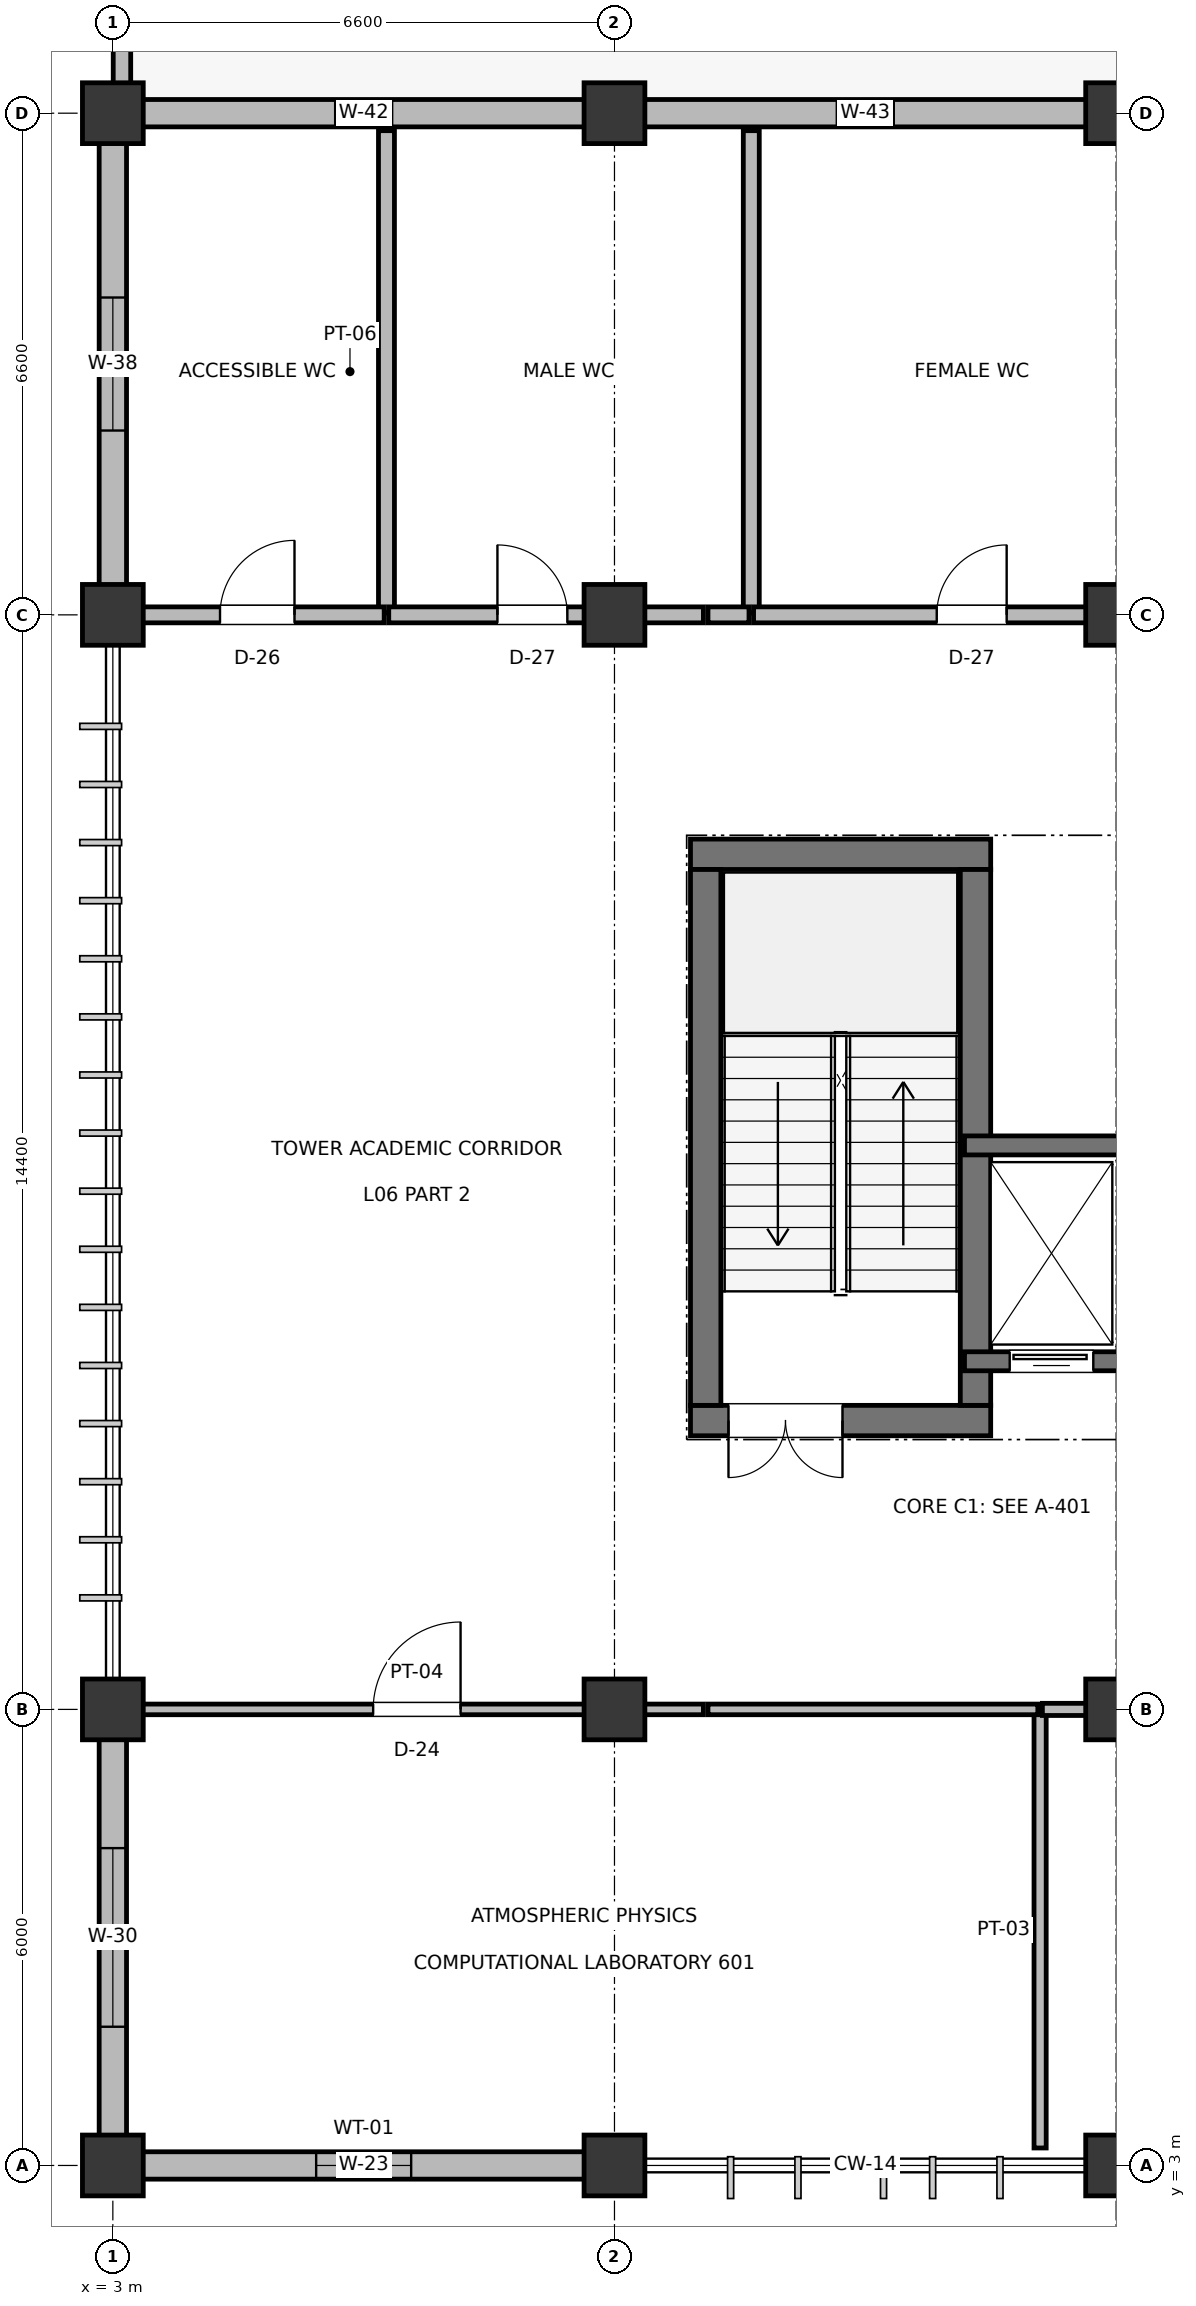
"""IFC4 building model, lengths in metres.
Left out: names, types, materials, properties, quantities, classifications, styles, units other than length and angle.
Written with IfcOpenShell. Run it as: python <this file> out.ifc"""

import sys

from ifc_helpers import new_model, si_unit, direction, frame, frame_2d, origin, origin_2d, place, context, subcontext, project, spatial, rectangle, extrude, element, fill, save


model = new_model("IFC4")
c1 = context("Model", 3, precision=1e-05, world=origin(), true_north=direction((0.0, 1.0)))
c2 = subcontext(c1, "Body", "Model", "MODEL_VIEW")
j1 = project(units=[si_unit("LENGTHUNIT", "METRE"), si_unit("PLANEANGLEUNIT", "RADIAN")], contexts=[c1])
p1 = place(None, origin())
s1 = spatial("IfcSite", under=j1, at=p1, CompositionType="ELEMENT")
p2 = place(p1, origin())
s2 = spatial("IfcBuilding", under=s1, at=p2, CompositionType="ELEMENT")
p3 = place(p2, frame((0.0, 0.0, 28.5)))
s3 = spatial("IfcBuildingStorey", under=s2, at=p3, CompositionType="ELEMENT", Elevation=28.5)
for number, where, z_axis, x_axis in (
    (1, (3.0, 3.0, 0.0), (0.0, 0.0, 1.0), (1.0, 0.0, 0.0)),
    (2, (3.0, 9.0, 0.0), (0.0, 0.0, 1.0), (1.0, 0.0, 0.0)),
    (3, (3.0, 23.4, 0.0), (0.0, 0.0, 1.0), (1.0, 0.0, 0.0)),
    (4, (3.0, 30.0, 0.0), (0.0, 0.0, 1.0), (1.0, 0.0, 0.0)),
    (5, (9.6, 3.0, 0.0), (0.0, 0.0, 1.0), (1.0, 0.0, 0.0)),
    (6, (9.6, 9.0, 0.0), (0.0, 0.0, 1.0), (1.0, 0.0, 0.0)),
    (7, (9.6, 23.4, 0.0), (0.0, 0.0, 1.0), (1.0, 0.0, 0.0)),
    (8, (9.6, 30.0, 0.0), (0.0, 0.0, 1.0), (1.0, 0.0, 0.0)),
    (9, (16.2, 3.0, 0.0), (0.0, 0.0, 1.0), (1.0, 0.0, 0.0)),
    (10, (16.2, 9.0, 0.0), (0.0, 0.0, 1.0), (1.0, 0.0, 0.0)),
    (11, (16.2, 23.4, 0.0), (0.0, 0.0, 1.0), (1.0, 0.0, 0.0)),
    (12, (16.2, 30.0, 0.0), (0.0, 0.0, 1.0), (1.0, 0.0, 0.0)),
):
    element("IfcColumn", number, at=place(p3, frame(where, z_axis=z_axis, x_axis=x_axis)), inside=s3, PredefinedType="COLUMN", context=c2, shape_type="SweptSolid", body=[
        extrude(rectangle(XDim=0.8, YDim=0.8, at=origin_2d()), origin(), (0.0, 0.0, 1.0), 4.5),
    ])
p4 = place(p3, frame((3.385, 3.0, 0.0), z_axis=(0.0, 0.0, 1.0), x_axis=(1.0, 0.0, 0.0)))
e13 = element("IfcWall", 13, at=p4, inside=s3, PredefinedType="SOLIDWALL", context=c2, shape_type="SweptSolid", body=[
    extrude(rectangle(XDim=5.83, YDim=0.36, at=frame_2d((2.915, 0.0))), origin(), (0.0, 0.0, 1.0), 3.575),
])
p5 = place(p4, frame((2.29, 0.0, 0.9)))
e14 = element("IfcOpeningElement", 14, at=p5, cuts=e13, PredefinedType="OPENING", context=c2, shape_type="SweptSolid", body=[
    extrude(rectangle(XDim=1.25, YDim=1.8, at=frame_2d((0.625, 0.9))), frame((0.0, 0.19, 0.0), z_axis=(0.0, -1.0, 0.0), x_axis=(1.0, 0.0, 0.0)), (0.0, 0.0, 1.0), 0.38),
])
p6 = place(p3, frame((3.0, 3.385, 0.0), z_axis=(0.0, 0.0, 1.0), x_axis=(0.0, 1.0, 0.0)))
e15 = element("IfcWall", 15, at=p6, inside=s3, PredefinedType="SOLIDWALL", context=c2, shape_type="SweptSolid", body=[
    extrude(rectangle(XDim=5.23, YDim=0.36, at=frame_2d((2.615, 0.0))), origin(), (0.0, 0.0, 1.0), 3.575),
])
p7 = place(p6, frame((1.44, 0.0, 0.9)))
e16 = element("IfcOpeningElement", 16, at=p7, cuts=e15, PredefinedType="OPENING", context=c2, shape_type="SweptSolid", body=[
    extrude(rectangle(XDim=2.35, YDim=1.9, at=frame_2d((1.175, 0.95))), frame((0.0, 0.19, 0.0), z_axis=(0.0, -1.0, 0.0), x_axis=(1.0, 0.0, 0.0)), (0.0, 0.0, 1.0), 0.38),
])
p8 = place(p3, frame((3.0, 23.785, 0.0), z_axis=(0.0, 0.0, 1.0), x_axis=(0.0, 1.0, 0.0)))
e17 = element("IfcWall", 17, at=p8, inside=s3, PredefinedType="SOLIDWALL", context=c2, shape_type="SweptSolid", body=[
    extrude(rectangle(XDim=5.83, YDim=0.36, at=frame_2d((2.915, 0.0))), origin(), (0.0, 0.0, 1.0), 3.575),
])
p9 = place(p8, frame((2.04, 0.0, 0.9)))
e18 = element("IfcOpeningElement", 18, at=p9, cuts=e17, PredefinedType="OPENING", context=c2, shape_type="SweptSolid", body=[
    extrude(rectangle(XDim=1.75, YDim=1.6, at=frame_2d((0.875, 0.8))), frame((0.0, 0.19, 0.0), z_axis=(0.0, -1.0, 0.0), x_axis=(1.0, 0.0, 0.0)), (0.0, 0.0, 1.0), 0.38),
])
p10 = place(p3, frame((3.385, 30.0, 0.0), z_axis=(0.0, 0.0, 1.0), x_axis=(1.0, 0.0, 0.0)))
e19 = element("IfcWall", 19, at=p10, inside=s3, PredefinedType="SOLIDWALL", context=c2, shape_type="SweptSolid", body=[
    extrude(rectangle(XDim=5.83, YDim=0.36, at=frame_2d((2.915, 0.0))), origin(), (0.0, 0.0, 1.0), 3.315),
])
p11 = place(p10, frame((2.54, 0.0, 0.9)))
e20 = element("IfcOpeningElement", 20, at=p11, cuts=e19, PredefinedType="OPENING", context=c2, shape_type="SweptSolid", body=[
    extrude(rectangle(XDim=0.75, YDim=1.35, at=frame_2d((0.375, 0.675))), frame((0.0, 0.19, 0.0), z_axis=(0.0, -1.0, 0.0), x_axis=(1.0, 0.0, 0.0)), (0.0, 0.0, 1.0), 0.38),
])
p12 = place(p3, frame((9.985, 30.0, 0.0), z_axis=(0.0, 0.0, 1.0), x_axis=(1.0, 0.0, 0.0)))
e21 = element("IfcWall", 21, at=p12, inside=s3, PredefinedType="SOLIDWALL", context=c2, shape_type="SweptSolid", body=[
    extrude(rectangle(XDim=5.83, YDim=0.36, at=frame_2d((2.915, 0.0))), origin(), (0.0, 0.0, 1.0), 3.525),
])
p13 = place(p12, frame((2.54, 0.0, 0.9)))
e22 = element("IfcOpeningElement", 22, at=p13, cuts=e21, PredefinedType="OPENING", context=c2, shape_type="SweptSolid", body=[
    extrude(rectangle(XDim=0.75, YDim=1.55, at=frame_2d((0.375, 0.775))), frame((0.0, 0.19, 0.0), z_axis=(0.0, -1.0, 0.0), x_axis=(1.0, 0.0, 0.0)), (0.0, 0.0, 1.0), 0.38),
])
p14 = place(p3, frame((3.12, 30.35, 0.0), z_axis=(0.0, 0.0, 1.0), x_axis=(0.0, 1.0, 0.0)))
e23 = element("IfcWall", 23, at=p14, inside=s3, PredefinedType="PARAPET", context=c2, shape_type="SweptSolid", body=[
    extrude(rectangle(XDim=14.9, YDim=0.23, at=frame_2d((7.45, 0.0))), origin(), (0.0, 0.0, 1.0), 1.05),
])
p15 = place(p3, frame((10.6, 12.8, 0.0), z_axis=(0.0, 0.0, 1.0), x_axis=(1.0, 0.0, 0.0)))
e24 = element("IfcWall", 24, at=p15, inside=s3, PredefinedType="SHEAR", context=c2, shape_type="SweptSolid", body=[
    extrude(rectangle(XDim=3.95, YDim=0.4, at=frame_2d((1.975, 0.0))), origin(), (0.0, 0.0, 1.0), 4.28),
])
p16 = place(p15, frame((0.5, 0.0, 0.0)))
e25 = element("IfcOpeningElement", 25, at=p16, cuts=e24, PredefinedType="OPENING", context=c2, shape_type="SweptSolid", body=[
    extrude(rectangle(XDim=1.5, YDim=2.2, at=frame_2d((0.75, 1.1))), frame((0.0, 0.21, 0.0), z_axis=(0.0, -1.0, 0.0), x_axis=(1.0, 0.0, 0.0)), (0.0, 0.0, 1.0), 0.42),
])
p17 = place(p3, frame((10.6, 20.25, 0.0), z_axis=(0.0, 0.0, 1.0), x_axis=(1.0, 0.0, 0.0)))
e26 = element("IfcWall", 26, at=p17, inside=s3, PredefinedType="SHEAR", context=c2, shape_type="SweptSolid", body=[
    extrude(rectangle(XDim=3.95, YDim=0.4, at=frame_2d((1.975, 0.0))), origin(), (0.0, 0.0, 1.0), 4.28),
])
for number, where, z_axis, x_axis in (
    (27, (10.8, 13.0, 0.0), (0.0, 0.0, 1.0), (0.0, 1.0, 0.0)),
    (28, (14.35, 13.0, 0.0), (0.0, 0.0, 1.0), (0.0, 1.0, 0.0)),
):
    element("IfcWall", number, at=place(p3, frame(where, z_axis=z_axis, x_axis=x_axis)), inside=s3, PredefinedType="SHEAR", context=c2, shape_type="SweptSolid", body=[
        extrude(rectangle(XDim=7.05, YDim=0.4, at=frame_2d((3.525, 0.0))), origin(), (0.0, 0.0, 1.0), 4.28),
    ])
p18 = place(p3, frame((14.205, 13.58, 0.0), z_axis=(0.0, 0.0, 1.0), x_axis=(1.0, 0.0, 0.0)))
e29 = element("IfcWall", 29, at=p18, inside=s3, PredefinedType="SHEAR", context=c2, shape_type="SweptSolid", body=[
    extrude(rectangle(XDim=2.29, YDim=0.25, at=frame_2d((1.145, 0.0))), origin(), (0.0, 0.0, 1.0), 4.26),
])
p19 = place(p18, frame((0.595, 0.0, 0.0)))
e30 = element("IfcOpeningElement", 30, at=p19, cuts=e29, PredefinedType="OPENING", context=c2, shape_type="SweptSolid", body=[
    extrude(rectangle(XDim=1.1, YDim=2.2, at=frame_2d((0.55, 1.1))), frame((0.0, 0.135, 0.0), z_axis=(0.0, -1.0, 0.0), x_axis=(1.0, 0.0, 0.0)), (0.0, 0.0, 1.0), 0.27),
])
p20 = place(p3, frame((14.205, 16.42, 0.0), z_axis=(0.0, 0.0, 1.0), x_axis=(1.0, 0.0, 0.0)))
e31 = element("IfcWall", 31, at=p20, inside=s3, PredefinedType="SHEAR", context=c2, shape_type="SweptSolid", body=[
    extrude(rectangle(XDim=2.29, YDim=0.25, at=frame_2d((1.145, 0.0))), origin(), (0.0, 0.0, 1.0), 4.26),
])
p21 = place(p3, frame((15.2, 3.23, 0.0), z_axis=(0.0, 0.0, 1.0), x_axis=(0.0, 1.0, 0.0)))
e32 = element("IfcWall", 32, at=p21, inside=s3, PredefinedType="PARTITIONING", context=c2, shape_type="SweptSolid", body=[
    extrude(rectangle(XDim=5.74, YDim=0.16, at=frame_2d((2.87, 0.0))), origin(), (0.0, 0.0, 1.0), 3.525),
])
p22 = place(p3, frame((3.23, 9.0, 0.0), z_axis=(0.0, 0.0, 1.0), x_axis=(1.0, 0.0, 0.0)))
e33 = element("IfcWall", 33, at=p22, inside=s3, PredefinedType="PARTITIONING", context=c2, shape_type="SweptSolid", body=[
    extrude(rectangle(XDim=7.54, YDim=0.14, at=frame_2d((3.77, 0.0))), origin(), (0.0, 0.0, 1.0), 3.415),
])
p23 = place(p22, frame((3.195, 0.0, 0.0)))
e34 = element("IfcOpeningElement", 34, at=p23, cuts=e33, PredefinedType="OPENING", context=c2, shape_type="SweptSolid", body=[
    extrude(rectangle(XDim=1.15, YDim=2.15, at=frame_2d((0.575, 1.075))), frame((0.0, 0.08, 0.0), z_axis=(0.0, -1.0, 0.0), x_axis=(1.0, 0.0, 0.0)), (0.0, 0.0, 1.0), 0.16),
])
p24 = place(p3, frame((10.83, 9.0, 0.0), z_axis=(0.0, 0.0, 1.0), x_axis=(1.0, 0.0, 0.0)))
e35 = element("IfcWall", 35, at=p24, inside=s3, PredefinedType="PARTITIONING", context=c2, shape_type="SweptSolid", body=[
    extrude(rectangle(XDim=4.34, YDim=0.14, at=frame_2d((2.17, 0.0))), origin(), (0.0, 0.0, 1.0), 3.525),
])
p25 = place(p3, frame((15.23, 9.0, 0.0), z_axis=(0.0, 0.0, 1.0), x_axis=(1.0, 0.0, 0.0)))
e36 = element("IfcWall", 36, at=p25, inside=s3, PredefinedType="PARTITIONING", context=c2, shape_type="SweptSolid", body=[
    extrude(rectangle(XDim=8.74, YDim=0.16, at=frame_2d((4.37, 0.0))), origin(), (0.0, 0.0, 1.0), 3.355),
])
p26 = place(p25, frame((3.78, 0.0, 0.0)))
e37 = element("IfcOpeningElement", 37, at=p26, cuts=e36, PredefinedType="OPENING", context=c2, shape_type="SweptSolid", body=[
    extrude(rectangle(XDim=1.18, YDim=2.2, at=frame_2d((0.59, 1.1))), frame((0.0, 0.09, 0.0), z_axis=(0.0, -1.0, 0.0), x_axis=(1.0, 0.0, 0.0)), (0.0, 0.0, 1.0), 0.18),
])
p27 = place(p3, frame((6.6, 23.43, 0.0), z_axis=(0.0, 0.0, 1.0), x_axis=(0.0, 1.0, 0.0)))
e38 = element("IfcWall", 38, at=p27, inside=s3, PredefinedType="PLUMBINGWALL", context=c2, shape_type="SweptSolid", body=[
    extrude(rectangle(XDim=6.34, YDim=0.21, at=frame_2d((3.17, 0.0))), origin(), (0.0, 0.0, 1.0), 3.315),
])
p28 = place(p3, frame((3.23, 23.4, 0.0), z_axis=(0.0, 0.0, 1.0), x_axis=(1.0, 0.0, 0.0)))
e39 = element("IfcWall", 39, at=p28, inside=s3, PredefinedType="PLUMBINGWALL", context=c2, shape_type="SweptSolid", body=[
    extrude(rectangle(XDim=3.34, YDim=0.21, at=frame_2d((1.67, 0.0))), origin(), (0.0, 0.0, 1.0), 3.315),
])
p29 = place(p28, frame((1.18, 0.0, 0.0)))
e40 = element("IfcOpeningElement", 40, at=p29, cuts=e39, PredefinedType="OPENING", context=c2, shape_type="SweptSolid", body=[
    extrude(rectangle(XDim=0.98, YDim=2.1, at=frame_2d((0.49, 1.05))), frame((0.0, 0.115, 0.0), z_axis=(0.0, -1.0, 0.0), x_axis=(1.0, 0.0, 0.0)), (0.0, 0.0, 1.0), 0.23),
])
p30 = place(p3, frame((11.4, 23.43, 0.0), z_axis=(0.0, 0.0, 1.0), x_axis=(0.0, 1.0, 0.0)))
e41 = element("IfcWall", 41, at=p30, inside=s3, PredefinedType="PLUMBINGWALL", context=c2, shape_type="SweptSolid", body=[
    extrude(rectangle(XDim=6.34, YDim=0.21, at=frame_2d((3.17, 0.0))), origin(), (0.0, 0.0, 1.0), 3.525),
])
p31 = place(p3, frame((6.63, 23.4, 0.0), z_axis=(0.0, 0.0, 1.0), x_axis=(1.0, 0.0, 0.0)))
e42 = element("IfcWall", 42, at=p31, inside=s3, PredefinedType="PLUMBINGWALL", context=c2, shape_type="SweptSolid", body=[
    extrude(rectangle(XDim=4.14, YDim=0.21, at=frame_2d((2.07, 0.0))), origin(), (0.0, 0.0, 1.0), 3.315),
])
p32 = place(p31, frame((1.43, 0.0, 0.0)))
e43 = element("IfcOpeningElement", 43, at=p32, cuts=e42, PredefinedType="OPENING", context=c2, shape_type="SweptSolid", body=[
    extrude(rectangle(XDim=0.92, YDim=2.1, at=frame_2d((0.46, 1.05))), frame((0.0, 0.115, 0.0), z_axis=(0.0, -1.0, 0.0), x_axis=(1.0, 0.0, 0.0)), (0.0, 0.0, 1.0), 0.23),
])
p33 = place(p3, frame((10.83, 23.4, 0.0), z_axis=(0.0, 0.0, 1.0), x_axis=(1.0, 0.0, 0.0)))
e44 = element("IfcWall", 44, at=p33, inside=s3, PredefinedType="PLUMBINGWALL", context=c2, shape_type="SweptSolid", body=[
    extrude(rectangle(XDim=0.54, YDim=0.21, at=frame_2d((0.27, 0.0))), origin(), (0.0, 0.0, 1.0), 3.525),
])
p34 = place(p3, frame((11.43, 23.4, 0.0), z_axis=(0.0, 0.0, 1.0), x_axis=(1.0, 0.0, 0.0)))
e45 = element("IfcWall", 45, at=p34, inside=s3, PredefinedType="PLUMBINGWALL", context=c2, shape_type="SweptSolid", body=[
    extrude(rectangle(XDim=5.74, YDim=0.21, at=frame_2d((2.87, 0.0))), origin(), (0.0, 0.0, 1.0), 3.295),
])
p35 = place(p34, frame((2.41, 0.0, 0.0)))
e46 = element("IfcOpeningElement", 46, at=p35, cuts=e45, PredefinedType="OPENING", context=c2, shape_type="SweptSolid", body=[
    extrude(rectangle(XDim=0.92, YDim=2.1, at=frame_2d((0.46, 1.05))), frame((0.0, 0.115, 0.0), z_axis=(0.0, -1.0, 0.0), x_axis=(1.0, 0.0, 0.0)), (0.0, 0.0, 1.0), 0.23),
])
p36 = place(p5, frame((1.25, 0.0, 0.0), z_axis=(0.0, 0.0, 1.0), x_axis=(-1.0, 0.0, 0.0)))
e47 = element("IfcWindow", 47, at=p36, inside=s3, PartitioningType="DOUBLE_PANEL_VERTICAL", PredefinedType="WINDOW", context=c2, shape_type="SweptSolid", body=[
    extrude(rectangle(XDim=1.25, YDim=1.8, at=frame_2d((0.625, 0.9))), frame((0.0, 0.03, 0.0), z_axis=(0.0, -1.0, 0.0), x_axis=(1.0, 0.0, 0.0)), (0.0, 0.0, 1.0), 0.06),
])
fill(e14, e47)
p37 = place(p7, origin())
e48 = element("IfcWindow", 48, at=p37, inside=s3, PartitioningType="DOUBLE_PANEL_VERTICAL", PredefinedType="WINDOW", context=c2, shape_type="SweptSolid", body=[
    extrude(rectangle(XDim=2.35, YDim=1.9, at=frame_2d((1.175, 0.95))), frame((0.0, 0.03, 0.0), z_axis=(0.0, -1.0, 0.0), x_axis=(1.0, 0.0, 0.0)), (0.0, 0.0, 1.0), 0.06),
])
fill(e16, e48)
p38 = place(p9, origin())
e49 = element("IfcWindow", 49, at=p38, inside=s3, PartitioningType="DOUBLE_PANEL_VERTICAL", PredefinedType="WINDOW", context=c2, shape_type="SweptSolid", body=[
    extrude(rectangle(XDim=1.75, YDim=1.6, at=frame_2d((0.875, 0.8))), frame((0.0, 0.03, 0.0), z_axis=(0.0, -1.0, 0.0), x_axis=(1.0, 0.0, 0.0)), (0.0, 0.0, 1.0), 0.06),
])
fill(e18, e49)
p39 = place(p11, origin())
e50 = element("IfcWindow", 50, at=p39, inside=s3, PartitioningType="DOUBLE_PANEL_VERTICAL", PredefinedType="WINDOW", context=c2, shape_type="SweptSolid", body=[
    extrude(rectangle(XDim=0.75, YDim=1.35, at=frame_2d((0.375, 0.675))), frame((0.0, 0.03, 0.0), z_axis=(0.0, -1.0, 0.0), x_axis=(1.0, 0.0, 0.0)), (0.0, 0.0, 1.0), 0.06),
])
fill(e20, e50)
p40 = place(p13, origin())
e51 = element("IfcWindow", 51, at=p40, inside=s3, PartitioningType="DOUBLE_PANEL_VERTICAL", PredefinedType="WINDOW", context=c2, shape_type="SweptSolid", body=[
    extrude(rectangle(XDim=0.75, YDim=1.55, at=frame_2d((0.375, 0.775))), frame((0.0, 0.03, 0.0), z_axis=(0.0, -1.0, 0.0), x_axis=(1.0, 0.0, 0.0)), (0.0, 0.0, 1.0), 0.06),
])
fill(e22, e51)
p41 = place(p16, frame((1.5, 0.0, 0.0), z_axis=(0.0, 0.0, 1.0), x_axis=(-1.0, 0.0, 0.0)))
e52 = element("IfcDoor", 52, at=p41, inside=s3, OperationType="DOUBLE_DOOR_SINGLE_SWING", PredefinedType="DOOR", context=c2, shape_type="SweptSolid", body=[
    extrude(rectangle(XDim=1.5, YDim=2.2, at=frame_2d((0.75, 1.1))), frame((0.0, 0.025, 0.0), z_axis=(0.0, -1.0, 0.0), x_axis=(1.0, 0.0, 0.0)), (0.0, 0.0, 1.0), 0.05),
])
fill(e25, e52)
p42 = place(p19, frame((1.1, 0.0, 0.0), z_axis=(0.0, 0.0, 1.0), x_axis=(-1.0, 0.0, 0.0)))
e53 = element("IfcDoor", 53, at=p42, inside=s3, OperationType="SLIDING_TO_LEFT", PredefinedType="DOOR", context=c2, shape_type="SweptSolid", body=[
    extrude(rectangle(XDim=1.1, YDim=2.2, at=frame_2d((0.55, 1.1))), frame((0.0, 0.025, 0.0), z_axis=(0.0, -1.0, 0.0), x_axis=(1.0, 0.0, 0.0)), (0.0, 0.0, 1.0), 0.05),
])
fill(e30, e53)
p43 = place(p23, origin())
e54 = element("IfcDoor", 54, at=p43, inside=s3, OperationType="SINGLE_SWING_RIGHT", PredefinedType="DOOR", context=c2, shape_type="SweptSolid", body=[
    extrude(rectangle(XDim=1.15, YDim=2.15, at=frame_2d((0.575, 1.075))), frame((0.0, 0.025, 0.0), z_axis=(0.0, -1.0, 0.0), x_axis=(1.0, 0.0, 0.0)), (0.0, 0.0, 1.0), 0.05),
])
fill(e34, e54)
p44 = place(p29, origin())
e55 = element("IfcDoor", 55, at=p44, inside=s3, OperationType="SINGLE_SWING_RIGHT", PredefinedType="DOOR", context=c2, shape_type="SweptSolid", body=[
    extrude(rectangle(XDim=0.98, YDim=2.1, at=frame_2d((0.49, 1.05))), frame((0.0, 0.025, 0.0), z_axis=(0.0, -1.0, 0.0), x_axis=(1.0, 0.0, 0.0)), (0.0, 0.0, 1.0), 0.05),
])
fill(e40, e55)
p45 = place(p32, origin())
e56 = element("IfcDoor", 56, at=p45, inside=s3, OperationType="SINGLE_SWING_LEFT", PredefinedType="DOOR", context=c2, shape_type="SweptSolid", body=[
    extrude(rectangle(XDim=0.92, YDim=2.1, at=frame_2d((0.46, 1.05))), frame((0.0, 0.025, 0.0), z_axis=(0.0, -1.0, 0.0), x_axis=(1.0, 0.0, 0.0)), (0.0, 0.0, 1.0), 0.05),
])
fill(e43, e56)
p46 = place(p35, origin())
e57 = element("IfcDoor", 57, at=p46, inside=s3, OperationType="SINGLE_SWING_RIGHT", PredefinedType="DOOR", context=c2, shape_type="SweptSolid", body=[
    extrude(rectangle(XDim=0.92, YDim=2.1, at=frame_2d((0.46, 1.05))), frame((0.0, 0.025, 0.0), z_axis=(0.0, -1.0, 0.0), x_axis=(1.0, 0.0, 0.0)), (0.0, 0.0, 1.0), 0.05),
])
fill(e46, e57)
save(model, sys.argv[1])
